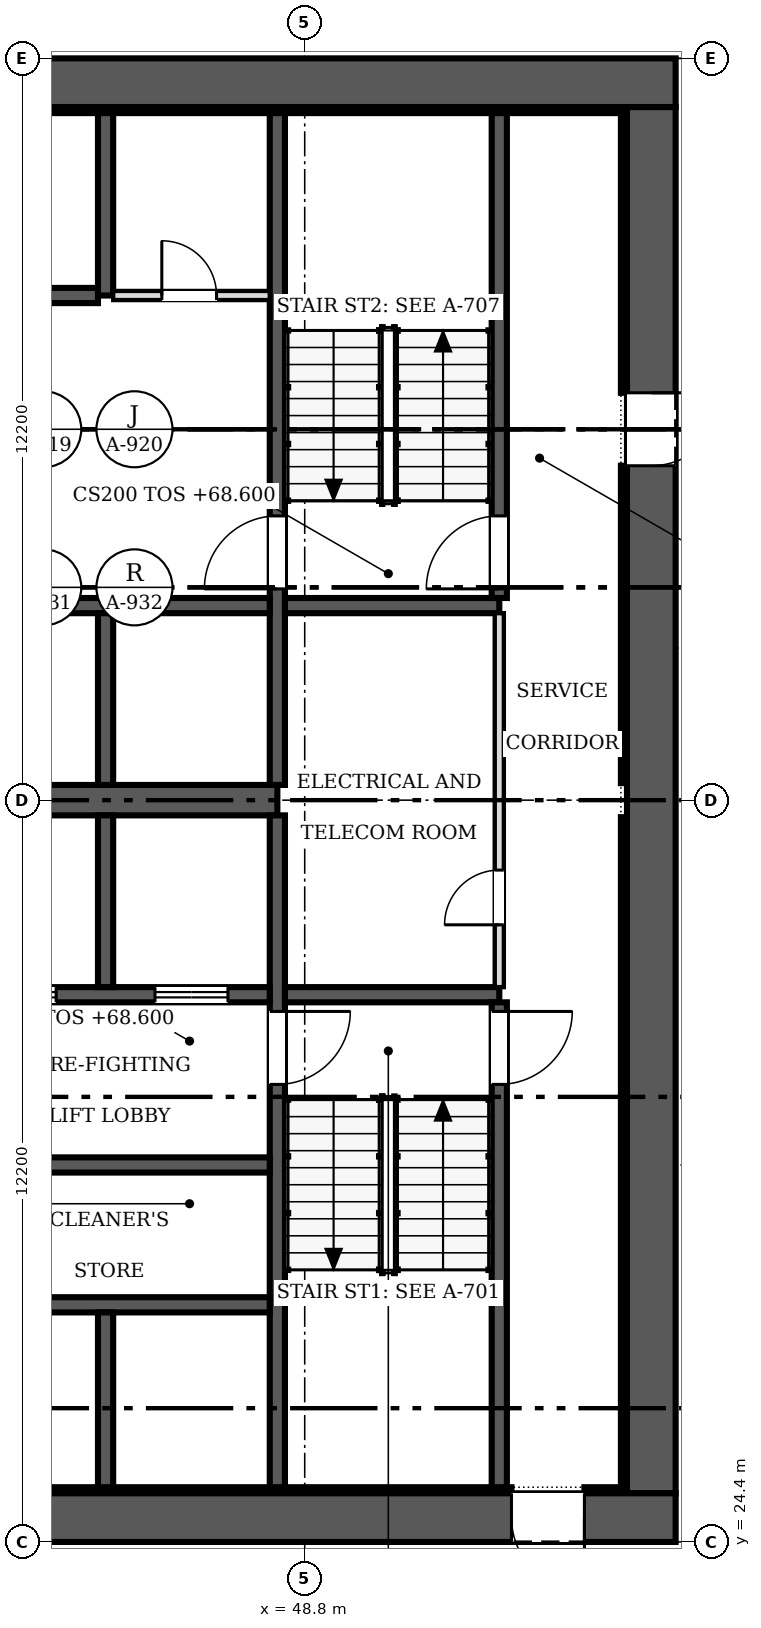
"""IFC4 building model, lengths in metres.
Left out: names, types, materials, properties, quantities, classifications, styles, units other than length and angle.
Written with IfcOpenShell. Run it as: python <this file> out.ifc"""

import sys

from ifc_helpers import new_model, si_unit, direction, frame, frame_2d, origin, place, context, subcontext, project, spatial, rectangle, extrude, source, transform, mapped, element, fill, save


model = new_model("IFC4")
c1 = context("Model", 3, precision=1e-05, world=origin(), true_north=direction((0.0, 1.0)))
c2 = subcontext(c1, "Body", "Model", "MODEL_VIEW")
j1 = project(units=[si_unit("LENGTHUNIT", "METRE"), si_unit("PLANEANGLEUNIT", "RADIAN")], contexts=[c1])
p1 = place(None, origin())
s1 = spatial("IfcSite", under=j1, at=p1, CompositionType="ELEMENT")
p2 = place(p1, origin())
s2 = spatial("IfcBuilding", under=s1, at=p2, CompositionType="ELEMENT")
p3 = place(p2, frame((0.0, 0.0, 68.6)))
s3 = spatial("IfcBuildingStorey", under=s2, at=p3, CompositionType="ELEMENT", Elevation=68.6)
p4 = place(p3, frame((54.9, 24.8, 0.0), z_axis=(0.0, 0.0, 1.0), x_axis=(-1.0, 0.0, 0.0)))
e1 = element("IfcWall", 1, at=p4, inside=s3, PredefinedType="SHEAR", context=c2, shape_type="SweptSolid", body=[
    extrude(rectangle(XDim=24.4, YDim=0.8, at=frame_2d((12.2, 0.0))), origin(), (0.0, 0.0, 1.0), 3.8),
])
m1 = source(origin(), c2, "Body", "SweptSolid", [
    extrude(rectangle(XDim=1.2, YDim=2.1, at=frame_2d((0.6, 1.05))), frame((0.0, 0.41, 0.0), z_axis=(0.0, -1.0, 0.0), x_axis=(1.0, 0.0, 0.0)), (0.0, 0.0, 1.0), 0.82),
])
p5 = place(p4, frame((1.5, 0.0, 0.0)))
e2 = element("IfcOpeningElement", 2, at=p5, cuts=e1, PredefinedType="OPENING", context=c2, shape_type="MappedRepresentation", body=[
    mapped(m1, transform((0.0, 0.0, 0.0), scale=1.0)),
])
p6 = place(p3, frame((30.5, 48.4, 0.0), z_axis=(0.0, 0.0, 1.0), x_axis=(1.0, 0.0, 0.0)))
e3 = element("IfcWall", 3, at=p6, inside=s3, PredefinedType="SHEAR", context=c2, shape_type="SweptSolid", body=[
    extrude(rectangle(XDim=24.4, YDim=0.8, at=frame_2d((12.2, 0.0))), origin(), (0.0, 0.0, 1.0), 3.8),
])
p7 = place(p3, frame((54.5, 48.0, 0.0), z_axis=(0.0, 0.0, 1.0), x_axis=(0.0, -1.0, 0.0)))
e4 = element("IfcWall", 4, at=p7, inside=s3, PredefinedType="SHEAR", context=c2, shape_type="SweptSolid", body=[
    extrude(rectangle(XDim=22.8, YDim=0.8, at=frame_2d((11.4, 0.0))), origin(), (0.0, 0.0, 1.0), 3.8),
])
p8 = place(p7, frame((4.7, 0.0, 0.0)))
e5 = element("IfcOpeningElement", 5, at=p8, cuts=e4, PredefinedType="OPENING", context=c2, shape_type="MappedRepresentation", body=[
    mapped(m1, transform((0.0, 0.0, 0.0), scale=1.0)),
])
p9 = place(p3, frame((31.3, 25.25, 0.0), z_axis=(0.0, 0.0, 1.0), x_axis=(1.0, 0.0, 0.0)))
e6 = element("IfcWall", 6, at=p9, inside=s3, PredefinedType="SOLIDWALL", context=c2, shape_type="SweptSolid", body=[
    extrude(rectangle(XDim=20.9, YDim=0.1, at=frame_2d((10.45, 0.0))), origin(), (0.0, 0.0, 1.0), 3.8),
])
p10 = place(p3, frame((53.4, 25.25, 0.0), z_axis=(0.0, 0.0, 1.0), x_axis=(1.0, 0.0, 0.0)))
e7 = element("IfcWall", 7, at=p10, inside=s3, PredefinedType="SOLIDWALL", context=c2, shape_type="SweptSolid", body=[
    extrude(rectangle(XDim=0.7, YDim=0.1, at=frame_2d((0.35, 0.0))), origin(), (0.0, 0.0, 1.0), 3.8),
])
p11 = place(p3, frame((31.3, 47.95, 0.0), z_axis=(0.0, 0.0, 1.0), x_axis=(1.0, 0.0, 0.0)))
e8 = element("IfcWall", 8, at=p11, inside=s3, PredefinedType="SOLIDWALL", context=c2, shape_type="SweptSolid", body=[
    extrude(rectangle(XDim=22.8, YDim=0.1, at=frame_2d((11.4, 0.0))), origin(), (0.0, 0.0, 1.0), 3.8),
])
p12 = place(p3, frame((54.05, 25.3, 0.0), z_axis=(0.0, 0.0, 1.0), x_axis=(0.0, 1.0, 0.0)))
e9 = element("IfcWall", 9, at=p12, inside=s3, PredefinedType="SOLIDWALL", context=c2, shape_type="SweptSolid", body=[
    extrude(rectangle(XDim=11.02, YDim=0.1, at=frame_2d((5.51, 0.0))), origin(), (0.0, 0.0, 1.0), 3.8),
])
p13 = place(p3, frame((54.05, 36.88, 0.0), z_axis=(0.0, 0.0, 1.0), x_axis=(0.0, 1.0, 0.0)))
e10 = element("IfcWall", 10, at=p13, inside=s3, PredefinedType="SOLIDWALL", context=c2, shape_type="SweptSolid", body=[
    extrude(rectangle(XDim=5.22, YDim=0.1, at=frame_2d((2.61, 0.0))), origin(), (0.0, 0.0, 1.0), 3.8),
])
p14 = place(p3, frame((54.05, 43.3, 0.0), z_axis=(0.0, 0.0, 1.0), x_axis=(0.0, 1.0, 0.0)))
e11 = element("IfcWall", 11, at=p14, inside=s3, PredefinedType="SOLIDWALL", context=c2, shape_type="SweptSolid", body=[
    extrude(rectangle(XDim=4.6, YDim=0.1, at=frame_2d((2.3, 0.0))), origin(), (0.0, 0.0, 1.0), 3.8),
])
p15 = place(p3, frame((31.4, 36.6, 0.0), z_axis=(0.0, 0.0, 1.0), x_axis=(1.0, 0.0, 0.0)))
e12 = element("IfcWall", 12, at=p15, inside=s3, PredefinedType="SHEAR", context=c2, shape_type="SweptSolid", body=[
    extrude(rectangle(XDim=16.95, YDim=0.5, at=frame_2d((8.475, 0.0))), origin(), (0.0, 0.0, 1.0), 3.8),
])
p16 = place(p3, frame((48.35, 36.35, 0.0), z_axis=(0.0, 0.0, 1.0), x_axis=(0.0, -1.0, 0.0)))
e13 = element("IfcWall", 13, at=p16, inside=s3, PredefinedType="SOLIDWALL", context=c2, shape_type="SweptSolid", body=[
    extrude(rectangle(XDim=11.05, YDim=0.25, at=frame_2d((5.525, 0.0))), origin(), (0.0, 0.0, 1.0), 3.8),
])
m2 = source(origin(), c2, "Body", "SweptSolid", [
    extrude(rectangle(XDim=1.2, YDim=2.1, at=frame_2d((0.6, 1.05))), frame((0.0, 0.135, 0.0), z_axis=(0.0, -1.0, 0.0), x_axis=(1.0, 0.0, 0.0)), (0.0, 0.0, 1.0), 0.27),
])
p17 = place(p16, frame((3.225, 0.0, 0.0)))
e14 = element("IfcOpeningElement", 14, at=p17, cuts=e13, PredefinedType="OPENING", context=c2, shape_type="MappedRepresentation", body=[
    mapped(m2, transform((0.0, 0.0, 0.0), scale=1.0)),
])
p18 = place(p3, frame((48.35, 47.9, 0.0), z_axis=(0.0, 0.0, 1.0), x_axis=(0.0, -1.0, 0.0)))
e15 = element("IfcWall", 15, at=p18, inside=s3, PredefinedType="SOLIDWALL", context=c2, shape_type="SweptSolid", body=[
    extrude(rectangle(XDim=11.05, YDim=0.25, at=frame_2d((5.525, 0.0))), origin(), (0.0, 0.0, 1.0), 3.8),
])
p19 = place(p18, frame((6.625, 0.0, 0.0)))
e16 = element("IfcOpeningElement", 16, at=p19, cuts=e15, PredefinedType="OPENING", context=c2, shape_type="MappedRepresentation", body=[
    mapped(m2, transform((0.0, 0.0, 0.0), scale=1.0)),
])
p20 = place(p3, frame((48.225, 33.4, 0.0), z_axis=(0.0, 0.0, 1.0), x_axis=(-1.0, 0.0, 0.0)))
e17 = element("IfcWall", 17, at=p20, inside=s3, PredefinedType="SOLIDWALL", context=c2, shape_type="SweptSolid", body=[
    extrude(rectangle(XDim=5.275, YDim=0.25, at=frame_2d((2.638, 0.0))), origin(), (0.0, 0.0, 1.0), 3.8),
])
p21 = place(p20, frame((3.512, 0.0, 0.0)))
e18 = element("IfcOpeningElement", 18, at=p21, cuts=e17, PredefinedType="OPENING", context=c2, shape_type="MappedRepresentation", body=[
    mapped(m2, transform((0.0, 0.0, 0.0), scale=1.0)),
])
p22 = place(p20, frame((0.688, 0.0, 0.0)))
e19 = element("IfcOpeningElement", 19, at=p22, cuts=e17, PredefinedType="OPENING", context=c2, shape_type="MappedRepresentation", body=[
    mapped(m2, transform((0.0, 0.0, 0.0), scale=1.0)),
])
p23 = place(p3, frame((48.475, 33.4, 0.0), z_axis=(0.0, 0.0, 1.0), x_axis=(1.0, 0.0, 0.0)))
e20 = element("IfcWall", 20, at=p23, inside=s3, PredefinedType="SOLIDWALL", context=c2, shape_type="SweptSolid", body=[
    extrude(rectangle(XDim=3.525, YDim=0.25, at=frame_2d((1.762, 0.0))), origin(), (0.0, 0.0, 1.0), 3.8),
])
for number, where, z_axis, x_axis in (
    (21, (42.95, 28.3, 0.0), (0.0, 0.0, 1.0), (1.0, 0.0, 0.0)),
    (22, (42.95, 39.8, 0.0), (0.0, 0.0, 1.0), (1.0, 0.0, 0.0)),
):
    element("IfcWall", number, at=place(p3, frame(where, z_axis=z_axis, x_axis=x_axis)), inside=s3, PredefinedType="SOLIDWALL", context=c2, shape_type="SweptSolid", body=[
        extrude(rectangle(XDim=5.275, YDim=0.25, at=frame_2d((2.638, 0.0))), origin(), (0.0, 0.0, 1.0), 3.8),
    ])
p24 = place(p3, frame((48.475, 39.8, 0.0), z_axis=(0.0, 0.0, 1.0), x_axis=(1.0, 0.0, 0.0)))
e23 = element("IfcWall", 23, at=p24, inside=s3, PredefinedType="SOLIDWALL", context=c2, shape_type="SweptSolid", body=[
    extrude(rectangle(XDim=3.525, YDim=0.25, at=frame_2d((1.762, 0.0))), origin(), (0.0, 0.0, 1.0), 3.8),
])
p25 = place(p3, frame((52.0, 25.3, 0.0), z_axis=(0.0, 0.0, 1.0), x_axis=(0.0, 1.0, 0.0)))
e24 = element("IfcWall", 24, at=p25, inside=s3, PredefinedType="SOLIDWALL", context=c2, shape_type="SweptSolid", body=[
    extrude(rectangle(XDim=7.975, YDim=0.25, at=frame_2d((3.987, 0.0))), origin(), (0.0, 0.0, 1.0), 3.8),
])
p26 = place(p25, frame((6.625, 0.0, 0.0)))
e25 = element("IfcOpeningElement", 25, at=p26, cuts=e24, PredefinedType="OPENING", context=c2, shape_type="MappedRepresentation", body=[
    mapped(m2, transform((0.0, 0.0, 0.0), scale=1.0)),
])
p27 = place(p3, frame((52.0, 39.925, 0.0), z_axis=(0.0, 0.0, 1.0), x_axis=(0.0, 1.0, 0.0)))
e26 = element("IfcWall", 26, at=p27, inside=s3, PredefinedType="SOLIDWALL", context=c2, shape_type="SweptSolid", body=[
    extrude(rectangle(XDim=7.975, YDim=0.25, at=frame_2d((3.987, 0.0))), origin(), (0.0, 0.0, 1.0), 3.8),
])
p28 = place(p27, frame((0.15, 0.0, 0.0)))
e27 = element("IfcOpeningElement", 27, at=p28, cuts=e26, PredefinedType="OPENING", context=c2, shape_type="MappedRepresentation", body=[
    mapped(m2, transform((0.0, 0.0, 0.0), scale=1.0)),
])
p29 = place(p3, frame((45.525, 33.525, 0.0), z_axis=(0.0, 0.0, 1.0), x_axis=(0.0, 1.0, 0.0)))
e28 = element("IfcWall", 28, at=p29, inside=s3, PredefinedType="SOLIDWALL", context=c2, shape_type="SweptSolid", body=[
    extrude(rectangle(XDim=2.825, YDim=0.25, at=frame_2d((1.413, 0.0))), origin(), (0.0, 0.0, 1.0), 3.8),
])
p30 = place(p3, frame((45.525, 36.85, 0.0), z_axis=(0.0, 0.0, 1.0), x_axis=(0.0, 1.0, 0.0)))
e29 = element("IfcWall", 29, at=p30, inside=s3, PredefinedType="SOLIDWALL", context=c2, shape_type="SweptSolid", body=[
    extrude(rectangle(XDim=2.825, YDim=0.25, at=frame_2d((1.413, 0.0))), origin(), (0.0, 0.0, 1.0), 3.8),
])
p31 = place(p3, frame((42.95, 30.6, 0.0), z_axis=(0.0, 0.0, 1.0), x_axis=(1.0, 0.0, 0.0)))
e30 = element("IfcWall", 30, at=p31, inside=s3, PredefinedType="SOLIDWALL", context=c2, shape_type="SweptSolid", body=[
    extrude(rectangle(XDim=5.275, YDim=0.25, at=frame_2d((2.638, 0.0))), origin(), (0.0, 0.0, 1.0), 3.8),
])
p32 = place(p3, frame((45.525, 25.3, 0.0), z_axis=(0.0, 0.0, 1.0), x_axis=(0.0, 1.0, 0.0)))
e31 = element("IfcWall", 31, at=p32, inside=s3, PredefinedType="SOLIDWALL", context=c2, shape_type="SweptSolid", body=[
    extrude(rectangle(XDim=2.875, YDim=0.25, at=frame_2d((1.438, 0.0))), origin(), (0.0, 0.0, 1.0), 3.8),
])
p33 = place(p3, frame((45.525, 44.9, 0.0), z_axis=(0.0, 0.0, 1.0), x_axis=(0.0, 1.0, 0.0)))
e32 = element("IfcWall", 32, at=p33, inside=s3, PredefinedType="SOLIDWALL", context=c2, shape_type="SweptSolid", body=[
    extrude(rectangle(XDim=3.0, YDim=0.25, at=frame_2d((1.5, 0.0))), origin(), (0.0, 0.0, 1.0), 3.8),
])
p34 = place(p3, frame((42.95, 44.9, 0.0), z_axis=(0.0, 0.0, 1.0), x_axis=(1.0, 0.0, 0.0)))
e33 = element("IfcWall", 33, at=p34, inside=s3, PredefinedType="SOLIDWALL", context=c2, shape_type="SweptSolid", body=[
    extrude(rectangle(XDim=2.45, YDim=0.25, at=frame_2d((1.225, 0.0))), origin(), (0.0, 0.0, 1.0), 3.8),
])
p35 = place(p3, frame((52.0, 33.525, 0.0), z_axis=(0.0, 0.0, 1.0), x_axis=(0.0, 1.0, 0.0)))
e34 = element("IfcWall", 34, at=p35, inside=s3, PredefinedType="PARTITIONING", context=c2, shape_type="SweptSolid", body=[
    extrude(rectangle(XDim=6.15, YDim=0.15, at=frame_2d((3.075, 0.0))), origin(), (0.0, 0.0, 1.0), 3.6),
])
m3 = source(origin(), c2, "Body", "SweptSolid", [
    extrude(rectangle(XDim=0.9, YDim=2.1, at=frame_2d((0.45, 1.05))), frame((0.0, 0.085, 0.0), z_axis=(0.0, -1.0, 0.0), x_axis=(1.0, 0.0, 0.0)), (0.0, 0.0, 1.0), 0.17),
])
p36 = place(p35, frame((1.025, 0.0, 0.0)))
e35 = element("IfcOpeningElement", 35, at=p36, cuts=e34, PredefinedType="OPENING", context=c2, shape_type="MappedRepresentation", body=[
    mapped(m3, transform((0.0, 0.0, 0.0), scale=1.0)),
])
p37 = place(p3, frame((45.65, 44.9, 0.0), z_axis=(0.0, 0.0, 1.0), x_axis=(1.0, 0.0, 0.0)))
e36 = element("IfcWall", 36, at=p37, inside=s3, PredefinedType="PARTITIONING", context=c2, shape_type="SweptSolid", body=[
    extrude(rectangle(XDim=2.575, YDim=0.15, at=frame_2d((1.288, 0.0))), origin(), (0.0, 0.0, 1.0), 3.6),
])
p38 = place(p37, frame((0.8, 0.0, 0.0)))
e37 = element("IfcOpeningElement", 37, at=p38, cuts=e36, PredefinedType="OPENING", context=c2, shape_type="MappedRepresentation", body=[
    mapped(m3, transform((0.0, 0.0, 0.0), scale=1.0)),
])
m4 = source(origin(), c2, "Body", "SweptSolid", [
    extrude(rectangle(XDim=1.2, YDim=2.1, at=frame_2d((0.6, 1.05))), frame((0.0, 0.025, 0.0), z_axis=(0.0, -1.0, 0.0), x_axis=(1.0, 0.0, 0.0)), (0.0, 0.0, 1.0), 0.05),
])
p39 = place(p5, origin())
e38 = element("IfcDoor", 38, at=p39, inside=s3, OperationType="SINGLE_SWING_LEFT", PredefinedType="DOOR", context=c2, shape_type="MappedRepresentation", body=[
    mapped(m4, transform((0.0, 0.0, 0.0), scale=1.0)),
])
fill(e2, e38)
p40 = place(p8, origin())
e39 = element("IfcDoor", 39, at=p40, inside=s3, OperationType="SINGLE_SWING_LEFT", PredefinedType="DOOR", context=c2, shape_type="MappedRepresentation", body=[
    mapped(m4, transform((0.0, 0.0, 0.0), scale=1.0)),
])
fill(e5, e39)
p41 = place(p17, origin())
e40 = element("IfcDoor", 40, at=p41, inside=s3, OperationType="SINGLE_SWING_LEFT", PredefinedType="DOOR", context=c2, shape_type="MappedRepresentation", body=[
    mapped(m4, transform((0.0, 0.0, 0.0), scale=1.0)),
])
fill(e14, e40)
p42 = place(p19, origin())
e41 = element("IfcDoor", 41, at=p42, inside=s3, OperationType="SINGLE_SWING_RIGHT", PredefinedType="DOOR", context=c2, shape_type="MappedRepresentation", body=[
    mapped(m4, transform((0.0, 0.0, 0.0), scale=1.0)),
])
fill(e16, e41)
p43 = place(p21, origin())
e42 = element("IfcDoor", 42, at=p43, inside=s3, OperationType="DOUBLE_DOOR_SLIDING", PredefinedType="DOOR", context=c2, shape_type="MappedRepresentation", body=[
    mapped(m4, transform((0.0, 0.0, 0.0), scale=1.0)),
])
fill(e18, e42)
p44 = place(p22, origin())
e43 = element("IfcDoor", 43, at=p44, inside=s3, OperationType="DOUBLE_DOOR_SLIDING", PredefinedType="DOOR", context=c2, shape_type="MappedRepresentation", body=[
    mapped(m4, transform((0.0, 0.0, 0.0), scale=1.0)),
])
fill(e19, e43)
p45 = place(p26, origin())
e44 = element("IfcDoor", 44, at=p45, inside=s3, OperationType="SINGLE_SWING_RIGHT", PredefinedType="DOOR", context=c2, shape_type="MappedRepresentation", body=[
    mapped(m4, transform((0.0, 0.0, 0.0), scale=1.0)),
])
fill(e25, e44)
p46 = place(p28, origin())
e45 = element("IfcDoor", 45, at=p46, inside=s3, OperationType="SINGLE_SWING_LEFT", PredefinedType="DOOR", context=c2, shape_type="MappedRepresentation", body=[
    mapped(m4, transform((0.0, 0.0, 0.0), scale=1.0)),
])
fill(e27, e45)
m5 = source(origin(), c2, "Body", "SweptSolid", [
    extrude(rectangle(XDim=0.9, YDim=2.1, at=frame_2d((0.45, 1.05))), frame((0.0, 0.025, 0.0), z_axis=(0.0, -1.0, 0.0), x_axis=(1.0, 0.0, 0.0)), (0.0, 0.0, 1.0), 0.05),
])
p47 = place(p36, origin())
e46 = element("IfcDoor", 46, at=p47, inside=s3, OperationType="SINGLE_SWING_LEFT", PredefinedType="DOOR", context=c2, shape_type="MappedRepresentation", body=[
    mapped(m5, transform((0.0, 0.0, 0.0), scale=1.0)),
])
fill(e35, e46)
p48 = place(p38, origin())
e47 = element("IfcDoor", 47, at=p48, inside=s3, OperationType="SINGLE_SWING_LEFT", PredefinedType="DOOR", context=c2, shape_type="MappedRepresentation", body=[
    mapped(m5, transform((0.0, 0.0, 0.0), scale=1.0)),
])
fill(e37, e47)
save(model, sys.argv[1])
